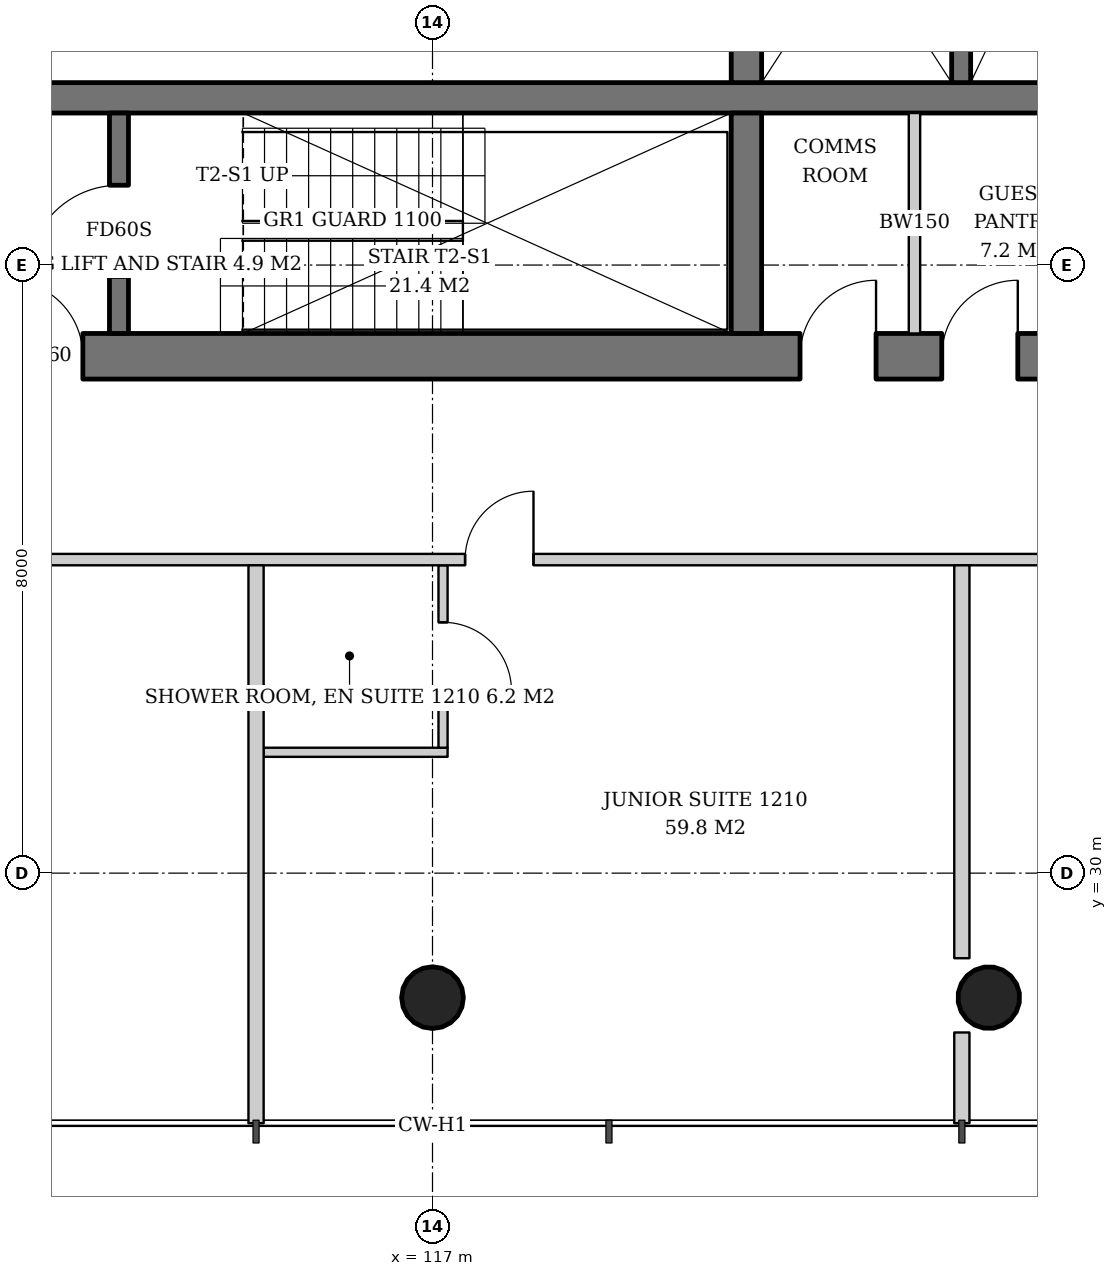
"""IFC4 building model, lengths in metres.
Left out: names, types, materials, properties, quantities, classifications, styles, units other than length and angle.
Written with IfcOpenShell. Run it as: python <this file> out.ifc"""

import sys

from ifc_helpers import new_model, si_unit, direction, frame, frame_2d, origin, origin_2d, place, context, subcontext, project, spatial, rectangle, hollow_circle, extrude, element, fill, save


model = new_model("IFC4")
c1 = context("Model", 3, precision=1e-05, world=origin(), true_north=direction((0.0, 1.0)))
c2 = subcontext(c1, "Body", "Model", "MODEL_VIEW")
j1 = project(units=[si_unit("LENGTHUNIT", "METRE"), si_unit("PLANEANGLEUNIT", "RADIAN")], contexts=[c1])
p1 = place(None, origin())
s1 = spatial("IfcSite", under=j1, at=p1, CompositionType="ELEMENT")
p2 = place(p1, origin())
s2 = spatial("IfcBuilding", under=s1, at=p2, CompositionType="ELEMENT")
p3 = place(p2, frame((0.0, 0.0, 51.4)))
s3 = spatial("IfcBuildingStorey", under=s2, at=p3, CompositionType="ELEMENT", Elevation=51.4)
p4 = place(p3, frame((117.0, 28.31, 0.0), z_axis=(0.0, 0.043069538298, 0.999072076915), x_axis=(-1.0, 0.0, 0.0)))
e1 = element("IfcColumn", 1, at=p4, inside=s3, PredefinedType="COLUMN", context=c2, shape_type="SweptSolid", body=[
    extrude(hollow_circle(Radius=0.406, WallThickness=0.03, at=origin_2d()), origin(), (0.0, 0.0, 1.0), 3.803),
])
p5 = place(p3, frame((124.345, 28.31, 0.0), z_axis=(-0.021497706284, 0.043059584825, 0.998841188968), x_axis=(-0.894693706707, -0.446680166538, 0.0)))
e2 = element("IfcColumn", 2, at=p5, inside=s3, PredefinedType="COLUMN", context=c2, shape_type="SweptSolid", body=[
    extrude(hollow_circle(Radius=0.406, WallThickness=0.03, at=origin_2d()), origin(), (0.0, 0.0, 1.0), 3.804),
])
p6 = place(p3, frame((107.5, 36.8, 0.0), z_axis=(0.0, 0.0, 1.0), x_axis=(1.0, 0.0, 0.0)))
e3 = element("IfcWall", 3, at=p6, inside=s3, PredefinedType="SHEAR", context=c2, shape_type="SweptSolid", body=[
    extrude(rectangle(XDim=19.0, YDim=0.6, at=frame_2d((9.5, 0.0))), origin(), (0.0, 0.0, 1.0), 3.8),
])
p7 = place(p6, frame((3.9, 0.0, 0.0)))
e4 = element("IfcOpeningElement", 4, at=p7, cuts=e3, PredefinedType="OPENING", context=c2, shape_type="SweptSolid", body=[
    extrude(rectangle(XDim=1.0, YDim=2.1, at=frame_2d((0.5, 1.05))), frame((0.0, 0.31, 0.0), z_axis=(0.0, -1.0, 0.0), x_axis=(1.0, 0.0, 0.0)), (0.0, 0.0, 1.0), 0.62),
])
p8 = place(p6, frame((14.335, 0.0, 0.0)))
e5 = element("IfcOpeningElement", 5, at=p8, cuts=e3, PredefinedType="OPENING", context=c2, shape_type="SweptSolid", body=[
    extrude(rectangle(XDim=1.0, YDim=2.1, at=frame_2d((0.5, 1.05))), frame((0.0, 0.31, 0.0), z_axis=(0.0, -1.0, 0.0), x_axis=(1.0, 0.0, 0.0)), (0.0, 0.0, 1.0), 0.62),
])
p9 = place(p6, frame((16.2, 0.0, 0.0)))
e6 = element("IfcOpeningElement", 6, at=p9, cuts=e3, PredefinedType="OPENING", context=c2, shape_type="SweptSolid", body=[
    extrude(rectangle(XDim=1.0, YDim=2.1, at=frame_2d((0.5, 1.05))), frame((0.0, 0.31, 0.0), z_axis=(0.0, -1.0, 0.0), x_axis=(1.0, 0.0, 0.0)), (0.0, 0.0, 1.0), 0.62),
])
p10 = place(p3, frame((108.1, 40.2, 0.0), z_axis=(0.0, 0.0, 1.0), x_axis=(1.0, 0.0, 0.0)))
e7 = element("IfcWall", 7, at=p10, inside=s3, PredefinedType="SHEAR", context=c2, shape_type="SweptSolid", body=[
    extrude(rectangle(XDim=17.8, YDim=0.4, at=frame_2d((8.9, 0.0))), origin(), (0.0, 0.0, 1.0), 3.8),
])
p11 = place(p3, frame((121.13, 37.1, 0.0), z_axis=(0.0, 0.0, 1.0), x_axis=(0.0, 1.0, 0.0)))
e8 = element("IfcWall", 8, at=p11, inside=s3, PredefinedType="SHEAR", context=c2, shape_type="SweptSolid", body=[
    extrude(rectangle(XDim=2.9, YDim=0.4, at=frame_2d((1.45, 0.0))), origin(), (0.0, 0.0, 1.0), 3.8),
])
p12 = place(p3, frame((121.13, 40.4, 0.0), z_axis=(0.0, 0.0, 1.0), x_axis=(0.0, 1.0, 0.0)))
e9 = element("IfcWall", 9, at=p12, inside=s3, PredefinedType="SHEAR", context=c2, shape_type="SweptSolid", body=[
    extrude(rectangle(XDim=11.2, YDim=0.4, at=frame_2d((5.6, 0.0))), origin(), (0.0, 0.0, 1.0), 3.8),
])
p13 = place(p3, frame((112.875, 37.1, 0.0), z_axis=(0.0, 0.0, 1.0), x_axis=(0.0, 1.0, 0.0)))
e10 = element("IfcWall", 10, at=p13, inside=s3, PredefinedType="SHEAR", context=c2, shape_type="SweptSolid", body=[
    extrude(rectangle(XDim=2.9, YDim=0.25, at=frame_2d((1.45, 0.0))), origin(), (0.0, 0.0, 1.0), 3.8),
])
p14 = place(p13, frame((0.75, 0.0, 0.0)))
e11 = element("IfcOpeningElement", 11, at=p14, cuts=e10, PredefinedType="OPENING", context=c2, shape_type="SweptSolid", body=[
    extrude(rectangle(XDim=1.2, YDim=2.1, at=frame_2d((0.6, 1.05))), frame((0.0, 0.135, 0.0), z_axis=(0.0, -1.0, 0.0), x_axis=(1.0, 0.0, 0.0)), (0.0, 0.0, 1.0), 0.27),
])
p15 = place(p3, frame((123.955, 44.25, 0.0), z_axis=(0.0, 0.0, 1.0), x_axis=(0.0, -1.0, 0.0)))
e12 = element("IfcWall", 12, at=p15, inside=s3, PredefinedType="SHEAR", context=c2, shape_type="SweptSolid", body=[
    extrude(rectangle(XDim=3.85, YDim=0.25, at=frame_2d((1.925, 0.0))), origin(), (0.0, 0.0, 1.0), 3.8),
])
p16 = place(p3, frame((123.341, 37.1, 0.0), z_axis=(0.0, 0.0, 1.0), x_axis=(0.0, 1.0, 0.0)))
e13 = element("IfcWall", 13, at=p16, inside=s3, PredefinedType="SOLIDWALL", context=c2, shape_type="SweptSolid", body=[
    extrude(rectangle(XDim=2.9, YDim=0.15, at=frame_2d((1.45, 0.0))), origin(), (0.0, 0.0, 1.0), 3.6),
])
p17 = place(p3, frame((114.779, 31.59, 0.0), z_axis=(0.0, 0.0, 1.0), x_axis=(1.0, 0.0, 0.0)))
e14 = element("IfcWall", 14, at=p17, inside=s3, PredefinedType="PARTITIONING", context=c2, shape_type="SweptSolid", body=[
    extrude(rectangle(XDim=2.42, YDim=0.12, at=frame_2d((1.21, 0.0))), origin(), (0.0, 0.0, 1.0), 2.847),
])
p18 = place(p3, frame((117.139, 34.05, 0.0), z_axis=(0.0, 0.0, 1.0), x_axis=(0.0, -1.0, 0.0)))
e15 = element("IfcWall", 15, at=p18, inside=s3, PredefinedType="PARTITIONING", context=c2, shape_type="SweptSolid", body=[
    extrude(rectangle(XDim=2.4, YDim=0.12, at=frame_2d((1.2, 0.0))), origin(), (0.0, 0.0, 1.0), 3.6),
])
p19 = place(p18, frame((0.75, 0.0, 0.0)))
e16 = element("IfcOpeningElement", 16, at=p19, cuts=e15, PredefinedType="OPENING", context=c2, shape_type="SweptSolid", body=[
    extrude(rectangle(XDim=0.9, YDim=2.1, at=frame_2d((0.45, 1.05))), frame((0.0, 0.07, 0.0), z_axis=(0.0, -1.0, 0.0), x_axis=(1.0, 0.0, 0.0)), (0.0, 0.0, 1.0), 0.14),
])
p20 = place(p3, frame((105.05, 34.125, 0.0), z_axis=(0.0, 0.0, 1.0), x_axis=(1.0, 0.0, 0.0)))
e17 = element("IfcWall", 17, at=p20, inside=s3, PredefinedType="PARTITIONING", context=c2, shape_type="SweptSolid", body=[
    extrude(rectangle(XDim=23.75, YDim=0.15, at=frame_2d((11.875, 0.0))), origin(), (0.0, 0.0, 1.0), 2.8),
])
p21 = place(p20, frame((2.068, 0.0, 0.0)))
e18 = element("IfcOpeningElement", 18, at=p21, cuts=e17, PredefinedType="OPENING", context=c2, shape_type="SweptSolid", body=[
    extrude(rectangle(XDim=0.9, YDim=2.1, at=frame_2d((0.45, 1.05))), frame((0.0, 0.085, 0.0), z_axis=(0.0, -1.0, 0.0), x_axis=(1.0, 0.0, 0.0)), (0.0, 0.0, 1.0), 0.17),
])
p22 = place(p20, frame((12.379, 0.0, 0.0)))
e19 = element("IfcOpeningElement", 19, at=p22, cuts=e17, PredefinedType="OPENING", context=c2, shape_type="SweptSolid", body=[
    extrude(rectangle(XDim=0.9, YDim=2.1, at=frame_2d((0.45, 1.05))), frame((0.0, 0.085, 0.0), z_axis=(0.0, -1.0, 0.0), x_axis=(1.0, 0.0, 0.0)), (0.0, 0.0, 1.0), 0.17),
])
p23 = place(p3, frame((114.678, 34.05, 0.0), z_axis=(0.0, 0.0, 1.0), x_axis=(0.0, -1.0, 0.0)))
e20 = element("IfcWall", 20, at=p23, inside=s3, PredefinedType="PARTITIONING", context=c2, shape_type="SweptSolid", body=[
    extrude(rectangle(XDim=7.34, YDim=0.2, at=frame_2d((3.67, 0.0))), origin(), (0.0, 0.0, 1.0), 3.05),
])
p24 = place(p3, frame((123.964, 34.05, 0.0), z_axis=(0.0, 0.0, 1.0), x_axis=(0.0, -1.0, 0.0)))
e21 = element("IfcWall", 21, at=p24, inside=s3, PredefinedType="PARTITIONING", context=c2, shape_type="SweptSolid", body=[
    extrude(rectangle(XDim=5.169, YDim=0.2, at=frame_2d((2.585, 0.0))), origin(), (0.0, 0.0, 1.0), 3.6),
])
p25 = place(p3, frame((123.964, 27.904, 0.0), z_axis=(0.0, 0.0, 1.0), x_axis=(0.0, -1.0, 0.0)))
e22 = element("IfcWall", 22, at=p25, inside=s3, PredefinedType="PARTITIONING", context=c2, shape_type="SweptSolid", body=[
    extrude(rectangle(XDim=1.194, YDim=0.2, at=frame_2d((0.597, 0.0))), origin(), (0.0, 0.0, 1.0), 3.6),
])
p26 = place(p14, origin())
e23 = element("IfcDoor", 23, at=p26, inside=s3, OperationType="SINGLE_SWING_LEFT", PredefinedType="DOOR", context=c2, shape_type="SweptSolid", body=[
    extrude(rectangle(XDim=1.2, YDim=2.1, at=frame_2d((0.6, 1.05))), frame((0.0, 0.025, 0.0), z_axis=(0.0, -1.0, 0.0), x_axis=(1.0, 0.0, 0.0)), (0.0, 0.0, 1.0), 0.05),
])
fill(e11, e23)
p27 = place(p7, origin())
e24 = element("IfcDoor", 24, at=p27, inside=s3, OperationType="SINGLE_SWING_LEFT", PredefinedType="DOOR", context=c2, shape_type="SweptSolid", body=[
    extrude(rectangle(XDim=1.0, YDim=2.1, at=frame_2d((0.5, 1.05))), frame((0.0, 0.025, 0.0), z_axis=(0.0, -1.0, 0.0), x_axis=(1.0, 0.0, 0.0)), (0.0, 0.0, 1.0), 0.05),
])
fill(e4, e24)
p28 = place(p8, origin())
e25 = element("IfcDoor", 25, at=p28, inside=s3, OperationType="SINGLE_SWING_RIGHT", PredefinedType="DOOR", context=c2, shape_type="SweptSolid", body=[
    extrude(rectangle(XDim=1.0, YDim=2.1, at=frame_2d((0.5, 1.05))), frame((0.0, 0.29, 0.0), z_axis=(0.0, -1.0, 0.0), x_axis=(1.0, 0.0, 0.0)), (0.0, 0.0, 1.0), 0.05),
])
fill(e5, e25)
p29 = place(p9, origin())
e26 = element("IfcDoor", 26, at=p29, inside=s3, OperationType="SINGLE_SWING_RIGHT", PredefinedType="DOOR", context=c2, shape_type="SweptSolid", body=[
    extrude(rectangle(XDim=1.0, YDim=2.1, at=frame_2d((0.5, 1.05))), frame((0.0, 0.29, 0.0), z_axis=(0.0, -1.0, 0.0), x_axis=(1.0, 0.0, 0.0)), (0.0, 0.0, 1.0), 0.05),
])
fill(e6, e26)
p30 = place(p19, origin())
e27 = element("IfcDoor", 27, at=p30, inside=s3, OperationType="SINGLE_SWING_RIGHT", PredefinedType="DOOR", context=c2, shape_type="SweptSolid", body=[
    extrude(rectangle(XDim=0.9, YDim=2.1, at=frame_2d((0.45, 1.05))), frame((0.0, 0.025, 0.0), z_axis=(0.0, -1.0, 0.0), x_axis=(1.0, 0.0, 0.0)), (0.0, 0.0, 1.0), 0.05),
])
fill(e16, e27)
p31 = place(p22, origin())
e28 = element("IfcDoor", 28, at=p31, inside=s3, OperationType="SINGLE_SWING_RIGHT", PredefinedType="DOOR", context=c2, shape_type="SweptSolid", body=[
    extrude(rectangle(XDim=0.9, YDim=2.1, at=frame_2d((0.45, 1.05))), frame((0.0, 0.025, 0.0), z_axis=(0.0, -1.0, 0.0), x_axis=(1.0, 0.0, 0.0)), (0.0, 0.0, 1.0), 0.05),
])
fill(e19, e28)
save(model, sys.argv[1])
